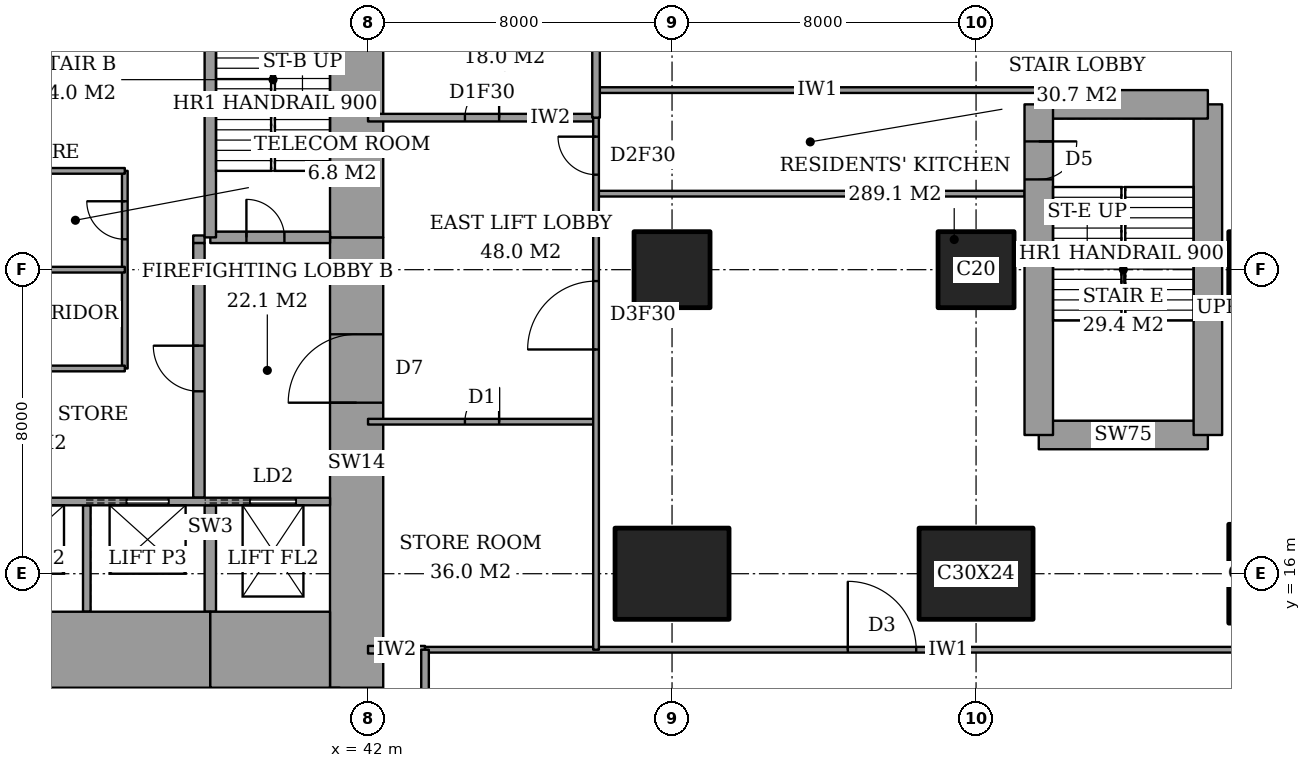
"""IFC4 building model, lengths in metres.
Left out: names, types, materials, properties, quantities, classifications, styles, units other than length and angle.
Written with IfcOpenShell. Run it as: python <this file> out.ifc"""

import sys

from ifc_helpers import new_model, si_unit, direction, frame, frame_2d, origin, origin_2d, place, context, subcontext, project, spatial, rectangle, extrude, element, fill, save


model = new_model("IFC4")
c1 = context("Model", 3, precision=1e-05, world=origin(), true_north=direction((0.0, 1.0)))
c2 = subcontext(c1, "Body", "Model", "MODEL_VIEW")
j1 = project(units=[si_unit("LENGTHUNIT", "METRE"), si_unit("PLANEANGLEUNIT", "RADIAN")], contexts=[c1])
p1 = place(None, origin())
s1 = spatial("IfcSite", under=j1, at=p1, CompositionType="ELEMENT")
p2 = place(p1, origin())
s2 = spatial("IfcBuilding", under=s1, at=p2, CompositionType="ELEMENT")
p3 = place(p2, frame((0.0, 0.0, 16.0)))
s3 = spatial("IfcBuildingStorey", under=s2, at=p3, CompositionType="ELEMENT", Elevation=16.0)
p4 = place(p3, frame((50.0, 16.0, 0.0), z_axis=(0.0, 0.0, 1.0), x_axis=(1.0, 0.0, 0.0)))
e1 = element("IfcColumn", 1, at=p4, inside=s3, PredefinedType="COLUMN", context=c2, shape_type="SweptSolid", body=[
    extrude(rectangle(XDim=3.0, YDim=2.4, at=origin_2d()), origin(), (0.0, 0.0, 1.0), 5.0),
])
p5 = place(p3, frame((50.0, 24.0, 0.0), z_axis=(0.0, 0.0, 1.0), x_axis=(1.0, 0.0, 0.0)))
e2 = element("IfcColumn", 2, at=p5, inside=s3, PredefinedType="COLUMN", context=c2, shape_type="SweptSolid", body=[
    extrude(rectangle(XDim=2.0, YDim=2.0, at=origin_2d()), origin(), (0.0, 0.0, 1.0), 5.0),
])
p6 = place(p3, frame((58.0, 16.0, 0.0), z_axis=(0.0, 0.0, 1.0), x_axis=(1.0, 0.0, 0.0)))
e3 = element("IfcColumn", 3, at=p6, inside=s3, PredefinedType="COLUMN", context=c2, shape_type="SweptSolid", body=[
    extrude(rectangle(XDim=3.0, YDim=2.4, at=origin_2d()), origin(), (0.0, 0.0, 1.0), 5.0),
])
p7 = place(p3, frame((58.0, 24.0, 0.0), z_axis=(0.0, 0.0, 1.0), x_axis=(1.0, 0.0, 0.0)))
e4 = element("IfcColumn", 4, at=p7, inside=s3, PredefinedType="COLUMN", context=c2, shape_type="SweptSolid", body=[
    extrude(rectangle(XDim=2.0, YDim=2.0, at=origin_2d()), origin(), (0.0, 0.0, 1.0), 5.0),
])
p8 = place(p3, frame((65.65, 16.0, 0.0), z_axis=(0.0, 0.0, 1.0), x_axis=(0.0, 1.0, 0.0)))
e5 = element("IfcColumn", 5, at=p8, inside=s3, PredefinedType="COLUMN", context=c2, shape_type="SweptSolid", body=[
    extrude(rectangle(XDim=2.6, YDim=2.0, at=origin_2d()), origin(), (0.0, 0.0, 1.0), 5.0),
])
p9 = place(p3, frame((65.65, 24.0, 0.0), z_axis=(0.0, 0.0, 1.0), x_axis=(1.0, 0.0, 0.0)))
e6 = element("IfcColumn", 6, at=p9, inside=s3, PredefinedType="COLUMN", context=c2, shape_type="SweptSolid", body=[
    extrude(rectangle(XDim=2.0, YDim=2.0, at=origin_2d()), origin(), (0.0, 0.0, 1.0), 5.0),
])
p10 = place(p3, frame((28.15, 14.0, 0.0), z_axis=(0.0, 0.0, 1.0), x_axis=(1.0, 0.0, 0.0)))
e7 = element("IfcWall", 7, at=p10, inside=s3, PredefinedType="SHEAR", context=c2, shape_type="SweptSolid", body=[
    extrude(rectangle(XDim=9.7, YDim=2.0, at=frame_2d((4.85, 0.0))), origin(), (0.0, 0.0, 1.0), 5.0),
])
p11 = place(p3, frame((37.85, 14.0, 0.0), z_axis=(0.0, 0.0, 1.0), x_axis=(1.0, 0.0, 0.0)))
e8 = element("IfcWall", 8, at=p11, inside=s3, PredefinedType="SHEAR", context=c2, shape_type="SweptSolid", body=[
    extrude(rectangle(XDim=3.15, YDim=2.0, at=frame_2d((1.575, 0.0))), origin(), (0.0, 0.0, 1.0), 5.0),
])
p12 = place(p3, frame((41.7, 13.0, 0.0), z_axis=(0.0, 0.0, 1.0), x_axis=(0.0, 1.0, 0.0)))
e9 = element("IfcWall", 9, at=p12, inside=s3, PredefinedType="SHEAR", context=c2, shape_type="SweptSolid", body=[
    extrude(rectangle(XDim=11.85, YDim=1.4, at=frame_2d((5.925, 0.0))), origin(), (0.0, 0.0, 1.0), 5.0),
])
p13 = place(p12, frame((7.5, 0.0, 0.0)))
e10 = element("IfcOpeningElement", 10, at=p13, cuts=e9, PredefinedType="OPENING", context=c2, shape_type="SweptSolid", body=[
    extrude(rectangle(XDim=1.8, YDim=2.4, at=frame_2d((0.9, 1.2))), frame((0.0, 0.71, 0.0), z_axis=(0.0, -1.0, 0.0), x_axis=(1.0, 0.0, 0.0)), (0.0, 0.0, 1.0), 1.42),
])
p14 = place(p3, frame((41.7, 24.85, 0.0), z_axis=(0.0, 0.0, 1.0), x_axis=(0.0, 1.0, 0.0)))
e11 = element("IfcWall", 11, at=p14, inside=s3, PredefinedType="SHEAR", context=c2, shape_type="SweptSolid", body=[
    extrude(rectangle(XDim=10.15, YDim=1.4, at=frame_2d((5.075, 0.0))), origin(), (0.0, 0.0, 1.0), 5.0),
])
p15 = place(p3, frame((37.85, 24.85, 0.0), z_axis=(0.0, 0.0, 1.0), x_axis=(0.0, 1.0, 0.0)))
e12 = element("IfcWall", 12, at=p15, inside=s3, PredefinedType="SHEAR", context=c2, shape_type="SweptSolid", body=[
    extrude(rectangle(XDim=8.15, YDim=0.3, at=frame_2d((4.075, 0.0))), origin(), (0.0, 0.0, 1.0), 5.0),
])
p16 = place(p3, frame((37.85, 24.85, 0.0), z_axis=(0.0, 0.0, 1.0), x_axis=(1.0, 0.0, 0.0)))
e13 = element("IfcWall", 13, at=p16, inside=s3, PredefinedType="SHEAR", context=c2, shape_type="SweptSolid", body=[
    extrude(rectangle(XDim=3.15, YDim=0.3, at=frame_2d((1.575, 0.0))), origin(), (0.0, 0.0, 1.0), 5.0),
])
p17 = place(p16, frame((0.95, 0.0, 0.0)))
e14 = element("IfcOpeningElement", 14, at=p17, cuts=e13, PredefinedType="OPENING", context=c2, shape_type="SweptSolid", body=[
    extrude(rectangle(XDim=1.0, YDim=2.1, at=frame_2d((0.5, 1.05))), frame((0.0, 0.16, 0.0), z_axis=(0.0, -1.0, 0.0), x_axis=(1.0, 0.0, 0.0)), (0.0, 0.0, 1.0), 0.32),
])
p18 = place(p3, frame((37.55, 18.0, 0.0), z_axis=(0.0, 0.0, 1.0), x_axis=(0.0, 1.0, 0.0)))
e15 = element("IfcWall", 15, at=p18, inside=s3, PredefinedType="PARTITIONING", context=c2, shape_type="SweptSolid", body=[
    extrude(rectangle(XDim=6.7, YDim=0.3, at=frame_2d((3.35, 0.0))), origin(), (0.0, 0.0, 1.0), 5.0),
])
p19 = place(p18, frame((2.8, 0.0, 0.0)))
e16 = element("IfcOpeningElement", 16, at=p19, cuts=e15, PredefinedType="OPENING", context=c2, shape_type="SweptSolid", body=[
    extrude(rectangle(XDim=1.2, YDim=2.1, at=frame_2d((0.6, 1.05))), frame((0.0, 0.16, 0.0), z_axis=(0.0, -1.0, 0.0), x_axis=(1.0, 0.0, 0.0)), (0.0, 0.0, 1.0), 0.32),
])
p20 = place(p3, frame((59.65, 19.65, 0.0), z_axis=(0.0, 0.0, 1.0), x_axis=(1.0, 0.0, 0.0)))
e17 = element("IfcWall", 17, at=p20, inside=s3, PredefinedType="SHEAR", context=c2, shape_type="SweptSolid", body=[
    extrude(rectangle(XDim=4.45, YDim=0.75, at=frame_2d((2.225, 0.0))), origin(), (0.0, 0.0, 1.0), 5.0),
])
p21 = place(p3, frame((64.1, 19.65, 0.0), z_axis=(0.0, 0.0, 1.0), x_axis=(0.0, 1.0, 0.0)))
e18 = element("IfcWall", 18, at=p21, inside=s3, PredefinedType="SHEAR", context=c2, shape_type="SweptSolid", body=[
    extrude(rectangle(XDim=8.7, YDim=0.75, at=frame_2d((4.35, 0.0))), origin(), (0.0, 0.0, 1.0), 5.0),
])
p22 = place(p3, frame((64.1, 28.35, 0.0), z_axis=(0.0, 0.0, 1.0), x_axis=(-1.0, 0.0, 0.0)))
e19 = element("IfcWall", 19, at=p22, inside=s3, PredefinedType="SHEAR", context=c2, shape_type="SweptSolid", body=[
    extrude(rectangle(XDim=4.45, YDim=0.75, at=frame_2d((2.225, 0.0))), origin(), (0.0, 0.0, 1.0), 5.0),
])
p23 = place(p3, frame((59.65, 28.35, 0.0), z_axis=(0.0, 0.0, 1.0), x_axis=(0.0, -1.0, 0.0)))
e20 = element("IfcWall", 20, at=p23, inside=s3, PredefinedType="SHEAR", context=c2, shape_type="SweptSolid", body=[
    extrude(rectangle(XDim=8.7, YDim=0.75, at=frame_2d((4.35, 0.0))), origin(), (0.0, 0.0, 1.0), 5.0),
])
p24 = place(p23, frame((0.975, 0.0, 0.0)))
e21 = element("IfcOpeningElement", 21, at=p24, cuts=e20, PredefinedType="OPENING", context=c2, shape_type="SweptSolid", body=[
    extrude(rectangle(XDim=1.0, YDim=2.1, at=frame_2d((0.5, 1.05))), frame((0.0, 0.385, 0.0), z_axis=(0.0, -1.0, 0.0), x_axis=(1.0, 0.0, 0.0)), (0.0, 0.0, 1.0), 0.77),
])
p25 = place(p3, frame((42.0, 14.0, 0.0), z_axis=(0.0, 0.0, 1.0), x_axis=(1.0, 0.0, 0.0)))
e22 = element("IfcWall", 22, at=p25, inside=s3, PredefinedType="PARTITIONING", context=c2, shape_type="SweptSolid", body=[
    extrude(rectangle(XDim=1.5, YDim=0.2, at=frame_2d((0.75, 0.0))), origin(), (0.0, 0.0, 1.0), 4.7),
])
p26 = place(p3, frame((43.5, 14.0, 0.0), z_axis=(0.0, 0.0, 1.0), x_axis=(1.0, 0.0, 0.0)))
e23 = element("IfcWall", 23, at=p26, inside=s3, PredefinedType="PARTITIONING", context=c2, shape_type="SweptSolid", body=[
    extrude(rectangle(XDim=22.95, YDim=0.15, at=frame_2d((11.475, 0.0))), origin(), (0.0, 0.0, 1.0), 4.7),
])
p27 = place(p26, frame((11.125, 0.0, 0.0)))
e24 = element("IfcOpeningElement", 24, at=p27, cuts=e23, PredefinedType="OPENING", context=c2, shape_type="SweptSolid", body=[
    extrude(rectangle(XDim=1.8, YDim=2.1, at=frame_2d((0.9, 1.05))), frame((0.0, 0.085, 0.0), z_axis=(0.0, -1.0, 0.0), x_axis=(1.0, 0.0, 0.0)), (0.0, 0.0, 1.0), 0.17),
])
p28 = place(p3, frame((42.0, 20.0, 0.0), z_axis=(0.0, 0.0, 1.0), x_axis=(1.0, 0.0, 0.0)))
e25 = element("IfcWall", 25, at=p28, inside=s3, PredefinedType="PARTITIONING", context=c2, shape_type="SweptSolid", body=[
    extrude(rectangle(XDim=6.0, YDim=0.15, at=frame_2d((3.0, 0.0))), origin(), (0.0, 0.0, 1.0), 4.7),
])
p29 = place(p28, frame((2.55, 0.0, 0.0)))
e26 = element("IfcOpeningElement", 26, at=p29, cuts=e25, PredefinedType="OPENING", context=c2, shape_type="SweptSolid", body=[
    extrude(rectangle(XDim=0.9, YDim=2.1, at=frame_2d((0.45, 1.05))), frame((0.0, 0.085, 0.0), z_axis=(0.0, -1.0, 0.0), x_axis=(1.0, 0.0, 0.0)), (0.0, 0.0, 1.0), 0.17),
])
p30 = place(p3, frame((48.0, 26.0, 0.0), z_axis=(0.0, 0.0, 1.0), x_axis=(1.0, 0.0, 0.0)))
e27 = element("IfcWall", 27, at=p30, inside=s3, PredefinedType="PARTITIONING", context=c2, shape_type="SweptSolid", body=[
    extrude(rectangle(XDim=11.275, YDim=0.15, at=frame_2d((5.637, 0.0))), origin(), (0.0, 0.0, 1.0), 4.7),
])
p31 = place(p3, frame((42.0, 28.0, 0.0), z_axis=(0.0, 0.0, 1.0), x_axis=(1.0, 0.0, 0.0)))
e28 = element("IfcWall", 28, at=p31, inside=s3, PredefinedType="PARTITIONING", context=c2, shape_type="SweptSolid", body=[
    extrude(rectangle(XDim=6.0, YDim=0.2, at=frame_2d((3.0, 0.0))), origin(), (0.0, 0.0, 1.0), 4.7),
])
p32 = place(p31, frame((2.55, 0.0, 0.0)))
e29 = element("IfcOpeningElement", 29, at=p32, cuts=e28, PredefinedType="OPENING", context=c2, shape_type="SweptSolid", body=[
    extrude(rectangle(XDim=0.9, YDim=2.1, at=frame_2d((0.45, 1.05))), frame((0.0, 0.11, 0.0), z_axis=(0.0, -1.0, 0.0), x_axis=(1.0, 0.0, 0.0)), (0.0, 0.0, 1.0), 0.22),
])
p33 = place(p3, frame((48.0, 28.725, 0.0), z_axis=(0.0, 0.0, 1.0), x_axis=(1.0, 0.0, 0.0)))
e30 = element("IfcWall", 30, at=p33, inside=s3, PredefinedType="PARTITIONING", context=c2, shape_type="SweptSolid", body=[
    extrude(rectangle(XDim=11.65, YDim=0.15, at=frame_2d((5.825, 0.0))), origin(), (0.0, 0.0, 1.0), 4.7),
])
p34 = place(p3, frame((41.15, -0.45, 0.0), z_axis=(0.0, 0.0, 1.0), x_axis=(0.0, 1.0, 0.0)))
e31 = element("IfcWall", 31, at=p34, inside=s3, PredefinedType="PARTITIONING", context=c2, shape_type="SweptSolid", body=[
    extrude(rectangle(XDim=13.45, YDim=0.2, at=frame_2d((6.725, 0.0))), origin(), (0.0, 0.0, 1.0), 4.7),
])
p35 = place(p3, frame((43.5, -0.45, 0.0), z_axis=(0.0, 0.0, 1.0), x_axis=(0.0, 1.0, 0.0)))
e32 = element("IfcWall", 32, at=p35, inside=s3, PredefinedType="PARTITIONING", context=c2, shape_type="SweptSolid", body=[
    extrude(rectangle(XDim=14.45, YDim=0.2, at=frame_2d((7.225, 0.0))), origin(), (0.0, 0.0, 1.0), 4.7),
])
p36 = place(p3, frame((48.0, 28.0, 0.0), z_axis=(0.0, 0.0, 1.0), x_axis=(0.0, 1.0, 0.0)))
e33 = element("IfcWall", 33, at=p36, inside=s3, PredefinedType="PARTITIONING", context=c2, shape_type="SweptSolid", body=[
    extrude(rectangle(XDim=20.561, YDim=0.2, at=frame_2d((10.281, 0.0))), origin(), (0.0, 0.0, 1.0), 4.7),
])
p37 = place(p3, frame((48.0, 14.0, 0.0), z_axis=(0.0, 0.0, 1.0), x_axis=(0.0, 1.0, 0.0)))
e34 = element("IfcWall", 34, at=p37, inside=s3, PredefinedType="PARTITIONING", context=c2, shape_type="SweptSolid", body=[
    extrude(rectangle(XDim=14.0, YDim=0.15, at=frame_2d((7.0, 0.0))), origin(), (0.0, 0.0, 1.0), 4.7),
])
p38 = place(p37, frame((12.5, 0.0, 0.0)))
e35 = element("IfcOpeningElement", 35, at=p38, cuts=e34, PredefinedType="OPENING", context=c2, shape_type="SweptSolid", body=[
    extrude(rectangle(XDim=1.0, YDim=2.1, at=frame_2d((0.5, 1.05))), frame((0.0, 0.085, 0.0), z_axis=(0.0, -1.0, 0.0), x_axis=(1.0, 0.0, 0.0)), (0.0, 0.0, 1.0), 0.17),
])
p39 = place(p37, frame((7.9, 0.0, 0.0)))
e36 = element("IfcOpeningElement", 36, at=p39, cuts=e34, PredefinedType="OPENING", context=c2, shape_type="SweptSolid", body=[
    extrude(rectangle(XDim=1.8, YDim=2.1, at=frame_2d((0.9, 1.05))), frame((0.0, 0.085, 0.0), z_axis=(0.0, -1.0, 0.0), x_axis=(1.0, 0.0, 0.0)), (0.0, 0.0, 1.0), 0.17),
])
p40 = place(p3, frame((28.3, 17.9, 0.0), z_axis=(0.0, 0.0, 1.0), x_axis=(1.0, 0.0, 0.0)))
e37 = element("IfcWall", 37, at=p40, inside=s3, PredefinedType="PARTITIONING", context=c2, shape_type="SweptSolid", body=[
    extrude(rectangle(XDim=12.7, YDim=0.2, at=frame_2d((6.35, 0.0))), origin(), (0.0, 0.0, 1.0), 5.0),
])
p41 = place(p40, frame((0.95, 0.0, 0.0)))
e38 = element("IfcOpeningElement", 38, at=p41, cuts=e37, PredefinedType="OPENING", context=c2, shape_type="SweptSolid", body=[
    extrude(rectangle(XDim=1.1, YDim=2.1, at=frame_2d((0.55, 1.05))), frame((0.0, 0.11, 0.0), z_axis=(0.0, -1.0, 0.0), x_axis=(1.0, 0.0, 0.0)), (0.0, 0.0, 1.0), 0.22),
])
p42 = place(p40, frame((4.15, 0.0, 0.0)))
e39 = element("IfcOpeningElement", 39, at=p42, cuts=e37, PredefinedType="OPENING", context=c2, shape_type="SweptSolid", body=[
    extrude(rectangle(XDim=1.1, YDim=2.1, at=frame_2d((0.55, 1.05))), frame((0.0, 0.11, 0.0), z_axis=(0.0, -1.0, 0.0), x_axis=(1.0, 0.0, 0.0)), (0.0, 0.0, 1.0), 0.22),
])
p43 = place(p40, frame((7.35, 0.0, 0.0)))
e40 = element("IfcOpeningElement", 40, at=p43, cuts=e37, PredefinedType="OPENING", context=c2, shape_type="SweptSolid", body=[
    extrude(rectangle(XDim=1.1, YDim=2.1, at=frame_2d((0.55, 1.05))), frame((0.0, 0.11, 0.0), z_axis=(0.0, -1.0, 0.0), x_axis=(1.0, 0.0, 0.0)), (0.0, 0.0, 1.0), 0.22),
])
p44 = place(p40, frame((10.6, 0.0, 0.0)))
e41 = element("IfcOpeningElement", 41, at=p44, cuts=e37, PredefinedType="OPENING", context=c2, shape_type="SweptSolid", body=[
    extrude(rectangle(XDim=1.2, YDim=2.1, at=frame_2d((0.6, 1.05))), frame((0.0, 0.11, 0.0), z_axis=(0.0, -1.0, 0.0), x_axis=(1.0, 0.0, 0.0)), (0.0, 0.0, 1.0), 0.22),
])
p45 = place(p3, frame((34.6, 15.0, 0.0), z_axis=(0.0, 0.0, 1.0), x_axis=(0.0, 1.0, 0.0)))
e42 = element("IfcWall", 42, at=p45, inside=s3, PredefinedType="PARTITIONING", context=c2, shape_type="SweptSolid", body=[
    extrude(rectangle(XDim=2.8, YDim=0.2, at=frame_2d((1.4, 0.0))), origin(), (0.0, 0.0, 1.0), 5.0),
])
p46 = place(p3, frame((37.85, 15.0, 0.0), z_axis=(0.0, 0.0, 1.0), x_axis=(0.0, 1.0, 0.0)))
e43 = element("IfcWall", 43, at=p46, inside=s3, PredefinedType="SHEAR", context=c2, shape_type="SweptSolid", body=[
    extrude(rectangle(XDim=2.8, YDim=0.3, at=frame_2d((1.4, 0.0))), origin(), (0.0, 0.0, 1.0), 5.0),
])
p47 = place(p3, frame((37.4, 24.8, 0.0), z_axis=(0.0, 0.0, 1.0), x_axis=(1.0, 0.0, 0.0)))
e44 = element("IfcWall", 44, at=p47, inside=s3, PredefinedType="PARTITIONING", context=c2, shape_type="SweptSolid", body=[
    extrude(rectangle(XDim=0.3, YDim=0.2, at=frame_2d((0.15, 0.0))), origin(), (0.0, 0.0, 1.0), 5.0),
])
p48 = place(p3, frame((30.4, 21.4, 0.0), z_axis=(0.0, 0.0, 1.0), x_axis=(1.0, 0.0, 0.0)))
e45 = element("IfcWall", 45, at=p48, inside=s3, PredefinedType="PARTITIONING", context=c2, shape_type="SweptSolid", body=[
    extrude(rectangle(XDim=5.2, YDim=0.15, at=frame_2d((2.6, 0.0))), origin(), (0.0, 0.0, 1.0), 4.7),
])
p49 = place(p48, frame((2.15, 0.0, 0.0)))
e46 = element("IfcOpeningElement", 46, at=p49, cuts=e45, PredefinedType="OPENING", context=c2, shape_type="SweptSolid", body=[
    extrude(rectangle(XDim=0.9, YDim=2.1, at=frame_2d((0.45, 1.05))), frame((0.0, 0.085, 0.0), z_axis=(0.0, -1.0, 0.0), x_axis=(1.0, 0.0, 0.0)), (0.0, 0.0, 1.0), 0.17),
])
p50 = place(p3, frame((30.4, 26.6, 0.0), z_axis=(0.0, 0.0, 1.0), x_axis=(1.0, 0.0, 0.0)))
e47 = element("IfcWall", 47, at=p50, inside=s3, PredefinedType="PARTITIONING", context=c2, shape_type="SweptSolid", body=[
    extrude(rectangle(XDim=5.2, YDim=0.15, at=frame_2d((2.6, 0.0))), origin(), (0.0, 0.0, 1.0), 4.7),
])
p51 = place(p3, frame((35.6, 21.4, 0.0), z_axis=(0.0, 0.0, 1.0), x_axis=(0.0, 1.0, 0.0)))
e48 = element("IfcWall", 48, at=p51, inside=s3, PredefinedType="PARTITIONING", context=c2, shape_type="SweptSolid", body=[
    extrude(rectangle(XDim=5.2, YDim=0.15, at=frame_2d((2.6, 0.0))), origin(), (0.0, 0.0, 1.0), 4.7),
])
p52 = place(p51, frame((3.4, 0.0, 0.0)))
e49 = element("IfcOpeningElement", 49, at=p52, cuts=e48, PredefinedType="OPENING", context=c2, shape_type="SweptSolid", body=[
    extrude(rectangle(XDim=1.0, YDim=2.1, at=frame_2d((0.5, 1.05))), frame((0.0, 0.085, 0.0), z_axis=(0.0, -1.0, 0.0), x_axis=(1.0, 0.0, 0.0)), (0.0, 0.0, 1.0), 0.17),
])
p53 = place(p3, frame((30.4, 24.0, 0.0), z_axis=(0.0, 0.0, 1.0), x_axis=(1.0, 0.0, 0.0)))
e50 = element("IfcWall", 50, at=p53, inside=s3, PredefinedType="PARTITIONING", context=c2, shape_type="SweptSolid", body=[
    extrude(rectangle(XDim=5.2, YDim=0.15, at=frame_2d((2.6, 0.0))), origin(), (0.0, 0.0, 1.0), 4.7),
])
p54 = place(p27, origin())
e51 = element("IfcDoor", 51, at=p54, inside=s3, OperationType="DOUBLE_DOOR_DOUBLE_SWING", PredefinedType="DOOR", context=c2, shape_type="SweptSolid", body=[
    extrude(rectangle(XDim=1.8, YDim=2.1, at=frame_2d((0.9, 1.05))), frame((0.0, 0.025, 0.0), z_axis=(0.0, -1.0, 0.0), x_axis=(1.0, 0.0, 0.0)), (0.0, 0.0, 1.0), 0.05),
])
fill(e24, e51)
p55 = place(p38, origin())
e52 = element("IfcDoor", 52, at=p55, inside=s3, OperationType="SINGLE_SWING_LEFT", PredefinedType="DOOR", context=c2, shape_type="SweptSolid", body=[
    extrude(rectangle(XDim=1.0, YDim=2.1, at=frame_2d((0.5, 1.05))), frame((0.0, 0.025, 0.0), z_axis=(0.0, -1.0, 0.0), x_axis=(1.0, 0.0, 0.0)), (0.0, 0.0, 1.0), 0.05),
])
fill(e35, e52)
p56 = place(p39, origin())
e53 = element("IfcDoor", 53, at=p56, inside=s3, OperationType="DOUBLE_DOOR_DOUBLE_SWING", PredefinedType="DOOR", context=c2, shape_type="SweptSolid", body=[
    extrude(rectangle(XDim=1.8, YDim=2.1, at=frame_2d((0.9, 1.05))), frame((0.0, 0.025, 0.0), z_axis=(0.0, -1.0, 0.0), x_axis=(1.0, 0.0, 0.0)), (0.0, 0.0, 1.0), 0.05),
])
fill(e36, e53)
p57 = place(p32, origin())
e54 = element("IfcDoor", 54, at=p57, inside=s3, OperationType="SINGLE_SWING_LEFT", PredefinedType="DOOR", context=c2, shape_type="SweptSolid", body=[
    extrude(rectangle(XDim=0.9, YDim=2.1, at=frame_2d((0.45, 1.05))), frame((0.0, 0.025, 0.0), z_axis=(0.0, -1.0, 0.0), x_axis=(1.0, 0.0, 0.0)), (0.0, 0.0, 1.0), 0.05),
])
fill(e29, e54)
p58 = place(p29, origin())
e55 = element("IfcDoor", 55, at=p58, inside=s3, OperationType="SINGLE_SWING_LEFT", PredefinedType="DOOR", context=c2, shape_type="SweptSolid", body=[
    extrude(rectangle(XDim=0.9, YDim=2.1, at=frame_2d((0.45, 1.05))), frame((0.0, 0.025, 0.0), z_axis=(0.0, -1.0, 0.0), x_axis=(1.0, 0.0, 0.0)), (0.0, 0.0, 1.0), 0.05),
])
fill(e26, e55)
p59 = place(p17, origin())
e56 = element("IfcDoor", 56, at=p59, inside=s3, OperationType="SINGLE_SWING_RIGHT", PredefinedType="DOOR", context=c2, shape_type="SweptSolid", body=[
    extrude(rectangle(XDim=1.0, YDim=2.1, at=frame_2d((0.5, 1.05))), frame((0.0, 0.025, 0.0), z_axis=(0.0, -1.0, 0.0), x_axis=(1.0, 0.0, 0.0)), (0.0, 0.0, 1.0), 0.05),
])
fill(e14, e56)
p60 = place(p19, origin())
e57 = element("IfcDoor", 57, at=p60, inside=s3, OperationType="SINGLE_SWING_LEFT", PredefinedType="DOOR", context=c2, shape_type="SweptSolid", body=[
    extrude(rectangle(XDim=1.2, YDim=2.1, at=frame_2d((0.6, 1.05))), frame((0.0, 0.025, 0.0), z_axis=(0.0, -1.0, 0.0), x_axis=(1.0, 0.0, 0.0)), (0.0, 0.0, 1.0), 0.05),
])
fill(e16, e57)
p61 = place(p13, origin())
e58 = element("IfcDoor", 58, at=p61, inside=s3, OperationType="DOUBLE_DOOR_DOUBLE_SWING", PredefinedType="DOOR", context=c2, shape_type="SweptSolid", body=[
    extrude(rectangle(XDim=1.8, YDim=2.4, at=frame_2d((0.9, 1.2))), frame((0.0, 0.025, 0.0), z_axis=(0.0, -1.0, 0.0), x_axis=(1.0, 0.0, 0.0)), (0.0, 0.0, 1.0), 0.05),
])
fill(e10, e58)
p62 = place(p52, origin())
e59 = element("IfcDoor", 59, at=p62, inside=s3, OperationType="SINGLE_SWING_LEFT", PredefinedType="DOOR", context=c2, shape_type="SweptSolid", body=[
    extrude(rectangle(XDim=1.0, YDim=2.1, at=frame_2d((0.5, 1.05))), frame((0.0, 0.025, 0.0), z_axis=(0.0, -1.0, 0.0), x_axis=(1.0, 0.0, 0.0)), (0.0, 0.0, 1.0), 0.05),
])
fill(e49, e59)
p63 = place(p43, origin())
e60 = element("IfcDoor", 60, at=p63, inside=s3, OperationType="SLIDING_TO_LEFT", PredefinedType="DOOR", context=c2, shape_type="SweptSolid", body=[
    extrude(rectangle(XDim=1.1, YDim=2.1, at=frame_2d((0.55, 1.05))), frame((0.0, 0.025, 0.0), z_axis=(0.0, -1.0, 0.0), x_axis=(1.0, 0.0, 0.0)), (0.0, 0.0, 1.0), 0.05),
])
fill(e40, e60)
p64 = place(p44, origin())
e61 = element("IfcDoor", 61, at=p64, inside=s3, OperationType="SLIDING_TO_LEFT", PredefinedType="DOOR", context=c2, shape_type="SweptSolid", body=[
    extrude(rectangle(XDim=1.2, YDim=2.1, at=frame_2d((0.6, 1.05))), frame((0.0, 0.025, 0.0), z_axis=(0.0, -1.0, 0.0), x_axis=(1.0, 0.0, 0.0)), (0.0, 0.0, 1.0), 0.05),
])
fill(e41, e61)
p65 = place(p24, origin())
e62 = element("IfcDoor", 62, at=p65, inside=s3, OperationType="SINGLE_SWING_RIGHT", PredefinedType="DOOR", context=c2, shape_type="SweptSolid", body=[
    extrude(rectangle(XDim=1.0, YDim=2.1, at=frame_2d((0.5, 1.05))), frame((0.0, 0.025, 0.0), z_axis=(0.0, -1.0, 0.0), x_axis=(1.0, 0.0, 0.0)), (0.0, 0.0, 1.0), 0.05),
])
fill(e21, e62)
save(model, sys.argv[1])
